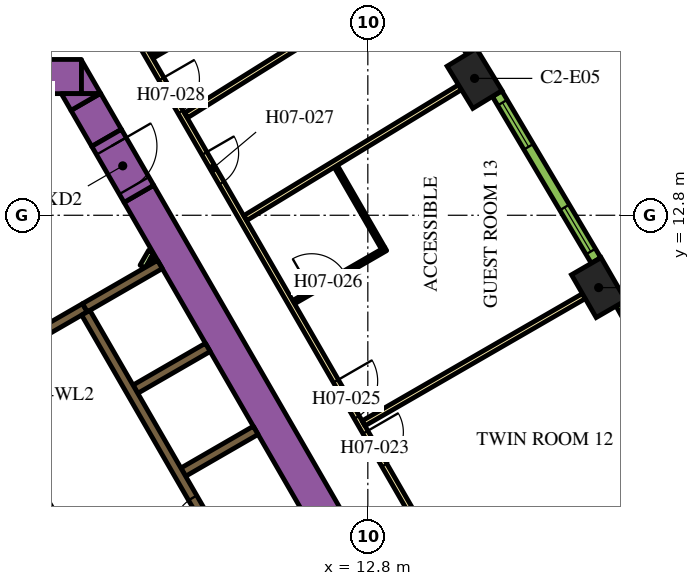
"""IFC4 building model, lengths in metres.
Left out: names, types, materials, properties, quantities, classifications, styles, units other than length and angle.
Written with IfcOpenShell. Run it as: python <this file> out.ifc"""

import sys

from ifc_helpers import new_model, si_unit, direction, frame, frame_2d, origin, origin_2d, place, context, subcontext, project, spatial, polyline, rectangle, outline, extrude, element, fill, save


model = new_model("IFC4")
c1 = context("Model", 3, precision=1e-05, world=origin(), true_north=direction((0.0, 1.0)))
c2 = subcontext(c1, "Body", "Model", "MODEL_VIEW")
j1 = project(units=[si_unit("LENGTHUNIT", "METRE"), si_unit("PLANEANGLEUNIT", "RADIAN")], contexts=[c1])
p1 = place(None, origin())
s1 = spatial("IfcSite", under=j1, at=p1, CompositionType="ELEMENT")
p2 = place(p1, origin())
s2 = spatial("IfcBuilding", under=s1, at=p2, CompositionType="ELEMENT")
p3 = place(p2, frame((0.0, 0.0, 99.3)))
s3 = spatial("IfcBuildingStorey", under=s2, at=p3, CompositionType="ELEMENT", Elevation=99.3)
for number, where, z_axis, x_axis in (
    (1, (18.874, 10.897, 0.0), (0.0, 0.0, 1.0), (-0.5, 0.866, 0.0)),
    (2, (15.609, 16.402, 0.0), (0.0, 0.0, 1.0), (-0.52, 0.854, 0.0)),
):
    element("IfcColumn", number, at=place(p3, frame(where, z_axis=z_axis, x_axis=x_axis)), inside=s3, PredefinedType="COLUMN", context=c2, shape_type="SweptSolid", body=[
        extrude(rectangle(XDim=1.3, YDim=0.9, at=origin_2d()), origin(), (0.0, 0.0, 1.0), 3.9),
    ])
p4 = place(p3, frame((6.776, 13.364, 0.0), z_axis=(0.0, 0.0, 1.0), x_axis=(0.500004177138, -0.8660229921, 0.0)))
e3 = element("IfcWall", 3, at=p4, inside=s3, PredefinedType="SOLIDWALL", context=c2, shape_type="SweptSolid", body=[
    extrude(rectangle(XDim=20.204, YDim=0.9, at=frame_2d((10.102, 0.0))), origin(), (0.0, 0.0, 1.0), 3.9),
])
p5 = place(p3, frame((-4.224, 16.45, 0.0), z_axis=(0.0, 0.0, 1.0), x_axis=(1.0, 0.0, 0.0)))
e4 = element("IfcWall", 4, at=p5, inside=s3, PredefinedType="SOLIDWALL", context=c2, shape_type="SweptSolid", body=[
    extrude(rectangle(XDim=9.488, YDim=0.9, at=frame_2d((4.744, 0.0))), origin(), (0.0, 0.0, 1.0), 3.9),
])
p6 = place(p3, origin())
e5 = element("IfcWall", 5, at=p6, inside=s3, PredefinedType="SOLIDWALL", context=c2, shape_type="SweptSolid", body=[
    extrude(outline(polyline([(5.265, 16.0), (5.265, 16.88), (5.773, 16.0), (5.265, 16.0)])), origin(), (0.0, 0.0, 1.0), 3.9),
])
p7 = place(p3, frame((5.926, 14.836, 0.0), z_axis=(0.0, 0.0, 1.0), x_axis=(-0.500076735116, 0.865981096212, 0.0)))
e6 = element("IfcWall", 6, at=p7, inside=s3, PredefinedType="SOLIDWALL", context=c2, shape_type="SweptSolid", body=[
    extrude(rectangle(XDim=1.094, YDim=0.9, at=frame_2d((0.547, 0.0))), origin(), (0.0, 0.0, 1.0), 3.9),
])
e7 = element("IfcWall", 7, at=p6, inside=s3, PredefinedType="SOLIDWALL", context=c2, shape_type="SweptSolid", body=[
    extrude(outline(polyline([(4.734, 16.0), (5.75, 16.0), (4.988, 15.56), (4.734, 16.0)])), origin(), (0.0, 0.0, 1.0), 3.9),
])
e8 = element("IfcWall", 8, at=p6, inside=s3, PredefinedType="SOLIDWALL", context=c2, shape_type="SweptSolid", body=[
    extrude(outline(polyline([(0.566, 6.725), (0.566, 6.875), (0.566, 6.875), (0.565, 6.875), (0.361, 6.875), (0.035, 7.439), (0.252, 7.564), (0.377, 7.348), (6.552, -3.348), (6.677, -3.564), (6.46, -3.689), (0.448, 6.725), (0.565, 6.725), (0.566, 6.725), (0.566, 6.725)])), origin(), (0.0, 0.0, 1.0), 3.9),
])
p8 = place(p3, frame((4.358, 9.791, 0.0), z_axis=(0.0, 0.0, 1.0), x_axis=(0.866079547155, 0.499906209203, 0.0)))
e9 = element("IfcWall", 9, at=p8, inside=s3, PredefinedType="SOLIDWALL", context=c2, shape_type="SweptSolid", body=[
    extrude(rectangle(XDim=1.15, YDim=0.25, at=frame_2d((0.575, 0.0))), origin(), (0.0, 0.0, 1.0), 3.9),
])
p9 = place(p3, frame((5.356, 10.367, 0.0), z_axis=(0.0, 0.0, 1.0), x_axis=(0.865978535641, 0.50008116922, 0.0)))
e10 = element("IfcWall", 10, at=p9, inside=s3, PredefinedType="SOLIDWALL", context=c2, shape_type="SweptSolid", body=[
    extrude(rectangle(XDim=2.278, YDim=0.25, at=frame_2d((1.139, 0.0))), origin(), (0.0, 0.0, 1.0), 3.9),
])
for number, where, z_axis, x_axis in (
    (11, (6.684, 8.224, 0.0), (0.0, 0.0, 1.0), (0.866, 0.5, 0.0)),
    (12, (7.944, 6.041, 0.0), (0.0, 0.0, 1.0), (0.866, 0.5, 0.0)),
):
    element("IfcWall", number, at=place(p3, frame(where, z_axis=z_axis, x_axis=x_axis)), inside=s3, PredefinedType="SOLIDWALL", context=c2, shape_type="SweptSolid", body=[
        extrude(rectangle(XDim=2.2, YDim=0.25, at=frame_2d((1.1, 0.0))), origin(), (0.0, 0.0, 1.0), 3.9),
    ])
p10 = place(p3, frame((6.872, 11.45, 0.0), z_axis=(0.0, 0.0, 1.0), x_axis=(0.499846793097, 0.866113839764, 0.0)))
e13 = element("IfcWall", 13, at=p10, inside=s3, PredefinedType="PARTITIONING", context=c2, shape_type="SweptSolid", body=[
    extrude(rectangle(XDim=0.453, YDim=0.15, at=frame_2d((0.227, 0.0))), origin(), (0.0, 0.0, 1.0), 2.75),
])
p11 = place(p3, frame((7.131, 11.6, 0.0), z_axis=(0.0, 0.0, 1.0), x_axis=(0.498600033135, 0.866832167699, 0.0)))
e14 = element("IfcWall", 14, at=p11, inside=s3, PredefinedType="PARTITIONING", context=c2, shape_type="SweptSolid", body=[
    extrude(rectangle(XDim=0.107, YDim=0.15, at=frame_2d((0.053, 0.0))), origin(), (0.0, 0.0, 1.0), 2.75),
])
p12 = place(p3, frame((11.553, -0.46, 0.0), z_axis=(0.0, 0.0, 1.0), x_axis=(-0.500006514828, 0.866021642414, 0.0)))
e15 = element("IfcWall", 15, at=p12, inside=s3, PredefinedType="SOLIDWALL", context=c2, shape_type="SweptSolid", body=[
    extrude(rectangle(XDim=12.35, YDim=0.25, at=frame_2d((6.175, 0.0))), origin(), (0.0, 0.0, 1.0), 3.9),
])
p13 = place(p12, frame((0.585, 0.0, 0.0)))
e16 = element("IfcOpeningElement", 16, at=p13, cuts=e15, PredefinedType="OPENING", context=c2, shape_type="SweptSolid", body=[
    extrude(rectangle(XDim=1.1, YDim=2.1, at=frame_2d((0.55, 1.05))), frame((0.0, 0.135, 0.0), z_axis=(0.0, -1.0, 0.0), x_axis=(1.0, 0.0, 0.0)), (0.0, 0.0, 1.0), 0.27),
])
p14 = place(p12, frame((3.105, 0.0, 0.0)))
e17 = element("IfcOpeningElement", 17, at=p14, cuts=e15, PredefinedType="OPENING", context=c2, shape_type="SweptSolid", body=[
    extrude(rectangle(XDim=1.1, YDim=2.1, at=frame_2d((0.55, 1.05))), frame((0.0, 0.135, 0.0), z_axis=(0.0, -1.0, 0.0), x_axis=(1.0, 0.0, 0.0)), (0.0, 0.0, 1.0), 0.27),
])
p15 = place(p12, frame((5.625, 0.0, 0.0)))
e18 = element("IfcOpeningElement", 18, at=p15, cuts=e15, PredefinedType="OPENING", context=c2, shape_type="SweptSolid", body=[
    extrude(rectangle(XDim=1.1, YDim=2.1, at=frame_2d((0.55, 1.05))), frame((0.0, 0.135, 0.0), z_axis=(0.0, -1.0, 0.0), x_axis=(1.0, 0.0, 0.0)), (0.0, 0.0, 1.0), 0.27),
])
p16 = place(p3, frame((8.565, -2.185, 0.0), z_axis=(0.0, 0.0, 1.0), x_axis=(-0.499997954832, 0.866026584559, 0.0)))
e19 = element("IfcWall", 19, at=p16, inside=s3, PredefinedType="SOLIDWALL", context=c2, shape_type="SweptSolid", body=[
    extrude(rectangle(XDim=12.35, YDim=0.25, at=frame_2d((6.175, 0.0))), origin(), (0.0, 0.0, 1.0), 3.9),
])
p17 = place(p16, frame((5.725, 0.0, 0.0)))
e20 = element("IfcOpeningElement", 20, at=p17, cuts=e19, PredefinedType="OPENING", context=c2, shape_type="SweptSolid", body=[
    extrude(rectangle(XDim=0.9, YDim=2.1, at=frame_2d((0.45, 1.05))), frame((0.0, 0.135, 0.0), z_axis=(0.0, -1.0, 0.0), x_axis=(1.0, 0.0, 0.0)), (0.0, 0.0, 1.0), 0.27),
])
p18 = place(p3, frame((5.926, 14.836, 0.0), z_axis=(0.0, 0.0, 1.0), x_axis=(0.500062241894, -0.865989465428, 0.0)))
e21 = element("IfcWall", 21, at=p18, inside=s3, PredefinedType="SOLIDWALL", context=c2, shape_type="SweptSolid", body=[
    extrude(rectangle(XDim=1.7, YDim=0.9, at=frame_2d((0.85, 0.0))), origin(), (0.0, 0.0, 1.0), 3.9),
])
p19 = place(p18, frame((0.25, 0.0, 0.0)))
e22 = element("IfcOpeningElement", 22, at=p19, cuts=e21, PredefinedType="OPENING", context=c2, shape_type="SweptSolid", body=[
    extrude(rectangle(XDim=1.2, YDim=2.1, at=frame_2d((0.6, 1.05))), frame((0.0, 0.46, 0.0), z_axis=(0.0, -1.0, 0.0), x_axis=(1.0, 0.0, 0.0)), (0.0, 0.0, 1.0), 0.92),
])
p20 = place(p3, frame((6.163, 18.475, 0.0), z_axis=(0.0, 0.0, 1.0), x_axis=(0.500001317485, -0.866024643133, 0.0)))
e23 = element("IfcWall", 23, at=p20, inside=s3, PredefinedType="PARTITIONING", context=c2, shape_type="SweptSolid", body=[
    extrude(rectangle(XDim=25.767, YDim=0.15, at=frame_2d((12.883, 0.0))), origin(), (0.0, 0.0, 1.0), 2.75),
])
p21 = place(p20, frame((24.241, 0.0, 0.0)))
e24 = element("IfcOpeningElement", 24, at=p21, cuts=e23, PredefinedType="OPENING", context=c2, shape_type="SweptSolid", body=[
    extrude(rectangle(XDim=1.0, YDim=2.1, at=frame_2d((0.5, 1.05))), frame((0.0, 0.085, 0.0), z_axis=(0.0, -1.0, 0.0), x_axis=(1.0, 0.0, 0.0)), (0.0, 0.0, 1.0), 0.17),
])
p22 = place(p20, frame((13.144, 0.0, 0.0)))
e25 = element("IfcOpeningElement", 25, at=p22, cuts=e23, PredefinedType="OPENING", context=c2, shape_type="SweptSolid", body=[
    extrude(rectangle(XDim=1.0, YDim=2.1, at=frame_2d((0.5, 1.05))), frame((0.0, 0.085, 0.0), z_axis=(0.0, -1.0, 0.0), x_axis=(1.0, 0.0, 0.0)), (0.0, 0.0, 1.0), 0.17),
])
p23 = place(p20, frame((11.592, 0.0, 0.0)))
e26 = element("IfcOpeningElement", 26, at=p23, cuts=e23, PredefinedType="OPENING", context=c2, shape_type="SweptSolid", body=[
    extrude(rectangle(XDim=1.1, YDim=2.1, at=frame_2d((0.55, 1.05))), frame((0.0, 0.085, 0.0), z_axis=(0.0, -1.0, 0.0), x_axis=(1.0, 0.0, 0.0)), (0.0, 0.0, 1.0), 0.17),
])
p24 = place(p20, frame((4.674, 0.0, 0.0)))
e27 = element("IfcOpeningElement", 27, at=p24, cuts=e23, PredefinedType="OPENING", context=c2, shape_type="SweptSolid", body=[
    extrude(rectangle(XDim=0.9, YDim=2.1, at=frame_2d((0.45, 1.05))), frame((0.0, 0.085, 0.0), z_axis=(0.0, -1.0, 0.0), x_axis=(1.0, 0.0, 0.0)), (0.0, 0.0, 1.0), 0.17),
])
p25 = place(p20, frame((2.411, 0.0, 0.0)))
e28 = element("IfcOpeningElement", 28, at=p25, cuts=e23, PredefinedType="OPENING", context=c2, shape_type="SweptSolid", body=[
    extrude(rectangle(XDim=1.0, YDim=2.1, at=frame_2d((0.5, 1.05))), frame((0.0, 0.085, 0.0), z_axis=(0.0, -1.0, 0.0), x_axis=(1.0, 0.0, 0.0)), (0.0, 0.0, 1.0), 0.17),
])
p26 = place(p3, frame((14.049, 19.2, 0.0), z_axis=(0.0, 0.0, 1.0), x_axis=(-0.847955867271, -0.530066832731, 0.0)))
e29 = element("IfcWall", 29, at=p26, inside=s3, PredefinedType="PARTITIONING", context=c2, shape_type="SweptSolid", body=[
    extrude(rectangle(XDim=7.111, YDim=0.15, at=frame_2d((3.556, 0.0))), origin(), (0.0, 0.0, 1.0), 2.75),
])
p27 = place(p3, frame((15.225, 16.167, 0.0), z_axis=(0.0, 0.0, 1.0), x_axis=(-0.854088713274, -0.520127359266, 0.0)))
e30 = element("IfcWall", 30, at=p27, inside=s3, PredefinedType="PARTITIONING", context=c2, shape_type="SweptSolid", body=[
    extrude(rectangle(XDim=6.611, YDim=0.15, at=frame_2d((3.305, 0.0))), origin(), (0.0, 0.0, 1.0), 2.75),
])
p28 = place(p3, frame((18.484, 10.672, 0.0), z_axis=(0.0, 0.0, 1.0), x_axis=(-0.866019162053, -0.50001081084, 0.0)))
e31 = element("IfcWall", 31, at=p28, inside=s3, PredefinedType="PARTITIONING", context=c2, shape_type="SweptSolid", body=[
    extrude(rectangle(XDim=6.694, YDim=0.15, at=frame_2d((3.347, 0.0))), origin(), (0.0, 0.0, 1.0), 2.75),
])
p29 = place(p3, frame((21.614, 5.102, 0.0), z_axis=(0.0, 0.0, 1.0), x_axis=(-0.877484555087, -0.479604895287, 0.0)))
e32 = element("IfcWall", 32, at=p29, inside=s3, PredefinedType="PARTITIONING", context=c2, shape_type="SweptSolid", body=[
    extrude(rectangle(XDim=6.611, YDim=0.15, at=frame_2d((3.306, 0.0))), origin(), (0.0, 0.0, 1.0), 2.75),
])
p30 = place(p3, frame((10.847, 10.513, 0.0), z_axis=(0.0, 0.0, 1.0), x_axis=(0.865996816683, 0.500049511043, 0.0)))
e33 = element("IfcWall", 33, at=p30, inside=s3, PredefinedType="PARTITIONING", context=c2, shape_type="SweptSolid", body=[
    extrude(rectangle(XDim=2.8, YDim=0.1, at=frame_2d((1.4, 0.0))), origin(), (0.0, 0.0, 1.0), 2.75),
])
p31 = place(p30, frame((0.55, 0.0, 0.0)))
e34 = element("IfcOpeningElement", 34, at=p31, cuts=e33, PredefinedType="OPENING", context=c2, shape_type="SweptSolid", body=[
    extrude(rectangle(XDim=1.0, YDim=2.1, at=frame_2d((0.5, 1.05))), frame((0.0, 0.06, 0.0), z_axis=(0.0, -1.0, 0.0), x_axis=(1.0, 0.0, 0.0)), (0.0, 0.0, 1.0), 0.12),
])
p32 = place(p3, frame((13.203, 11.931, 0.0), z_axis=(0.0, 0.0, 1.0), x_axis=(-0.499988411372, 0.866032094379, 0.0)))
e35 = element("IfcWall", 35, at=p32, inside=s3, PredefinedType="PARTITIONING", context=c2, shape_type="SweptSolid", body=[
    extrude(rectangle(XDim=2.49, YDim=0.1, at=frame_2d((1.245, 0.0))), origin(), (0.0, 0.0, 1.0), 2.75),
])
p33 = place(p3, frame((7.118, 16.971, 0.0), z_axis=(0.0, 0.0, 1.0), x_axis=(0.866021400173, 0.500006934395, 0.0)))
e36 = element("IfcWall", 36, at=p33, inside=s3, PredefinedType="PARTITIONING", context=c2, shape_type="SweptSolid", body=[
    extrude(rectangle(XDim=2.6, YDim=0.1, at=frame_2d((1.3, 0.0))), origin(), (0.0, 0.0, 1.0), 2.75),
])
p34 = place(p33, frame((0.6, 0.0, 0.0)))
e37 = element("IfcOpeningElement", 37, at=p34, cuts=e36, PredefinedType="OPENING", context=c2, shape_type="SweptSolid", body=[
    extrude(rectangle(XDim=0.9, YDim=2.1, at=frame_2d((0.45, 1.05))), frame((0.0, 0.06, 0.0), z_axis=(0.0, -1.0, 0.0), x_axis=(1.0, 0.0, 0.0)), (0.0, 0.0, 1.0), 0.12),
])
p35 = place(p3, frame((21.956, 6.033, 0.0), z_axis=(0.0, 0.0, 1.0), x_axis=(-0.48983164787, 0.87181704316, 0.0)))
e38 = element("IfcWall", 38, at=p35, inside=s3, PredefinedType="SOLIDWALL", context=c2, shape_type="SweptSolid", body=[
    extrude(rectangle(XDim=5.1, YDim=0.29, at=frame_2d((2.55, 0.0))), origin(), (0.0, 0.0, 1.0), 3.65),
])
p36 = place(p35, frame((0.273, 0.0, 0.9)))
e39 = element("IfcOpeningElement", 39, at=p36, cuts=e38, PredefinedType="OPENING", context=c2, shape_type="SweptSolid", body=[
    extrude(rectangle(XDim=1.35, YDim=2.15, at=frame_2d((0.675, 1.075))), frame((0.0, 0.155, 0.0), z_axis=(0.0, -1.0, 0.0), x_axis=(1.0, 0.0, 0.0)), (0.0, 0.0, 1.0), 0.31),
])
p37 = place(p35, frame((3.478, 0.0, 0.9)))
e40 = element("IfcOpeningElement", 40, at=p37, cuts=e38, PredefinedType="OPENING", context=c2, shape_type="SweptSolid", body=[
    extrude(rectangle(XDim=1.35, YDim=2.15, at=frame_2d((0.675, 1.075))), frame((0.0, 0.155, 0.0), z_axis=(0.0, -1.0, 0.0), x_axis=(1.0, 0.0, 0.0)), (0.0, 0.0, 1.0), 0.31),
])
p38 = place(p3, frame((18.805, 11.611, 0.0), z_axis=(0.0, 0.0, 1.0), x_axis=(-0.510054281659, 0.860142214847, 0.0)))
e41 = element("IfcWall", 41, at=p38, inside=s3, PredefinedType="SOLIDWALL", context=c2, shape_type="SweptSolid", body=[
    extrude(rectangle(XDim=5.101, YDim=0.29, at=frame_2d((2.55, 0.0))), origin(), (0.0, 0.0, 1.0), 3.65),
])
p39 = place(p38, frame((0.273, 0.0, 0.9)))
e42 = element("IfcOpeningElement", 42, at=p39, cuts=e41, PredefinedType="OPENING", context=c2, shape_type="SweptSolid", body=[
    extrude(rectangle(XDim=1.35, YDim=2.15, at=frame_2d((0.675, 1.075))), frame((0.0, 0.155, 0.0), z_axis=(0.0, -1.0, 0.0), x_axis=(1.0, 0.0, 0.0)), (0.0, 0.0, 1.0), 0.31),
])
p40 = place(p38, frame((3.478, 0.0, 0.9)))
e43 = element("IfcOpeningElement", 43, at=p40, cuts=e41, PredefinedType="OPENING", context=c2, shape_type="SweptSolid", body=[
    extrude(rectangle(XDim=1.35, YDim=2.15, at=frame_2d((0.675, 1.075))), frame((0.0, 0.155, 0.0), z_axis=(0.0, -1.0, 0.0), x_axis=(1.0, 0.0, 0.0)), (0.0, 0.0, 1.0), 0.31),
])
p41 = place(p3, frame((15.524, 17.114, 0.0), z_axis=(0.0, 0.0, 1.0), x_axis=(-0.530072082134, 0.847952585787, 0.0)))
e44 = element("IfcWall", 44, at=p41, inside=s3, PredefinedType="SOLIDWALL", context=c2, shape_type="SweptSolid", body=[
    extrude(rectangle(XDim=5.1, YDim=0.29, at=frame_2d((2.55, 0.0))), origin(), (0.0, 0.0, 1.0), 3.65),
])
p42 = place(p41, frame((0.273, 0.0, 0.9)))
e45 = element("IfcOpeningElement", 45, at=p42, cuts=e44, PredefinedType="OPENING", context=c2, shape_type="SweptSolid", body=[
    extrude(rectangle(XDim=1.35, YDim=2.15, at=frame_2d((0.675, 1.075))), frame((0.0, 0.155, 0.0), z_axis=(0.0, -1.0, 0.0), x_axis=(1.0, 0.0, 0.0)), (0.0, 0.0, 1.0), 0.31),
])
p43 = place(p41, frame((3.478, 0.0, 0.9)))
e46 = element("IfcOpeningElement", 46, at=p43, cuts=e44, PredefinedType="OPENING", context=c2, shape_type="SweptSolid", body=[
    extrude(rectangle(XDim=1.35, YDim=2.15, at=frame_2d((0.675, 1.075))), frame((0.0, 0.155, 0.0), z_axis=(0.0, -1.0, 0.0), x_axis=(1.0, 0.0, 0.0)), (0.0, 0.0, 1.0), 0.31),
])
p44 = place(p15, origin())
e47 = element("IfcDoor", 47, at=p44, inside=s3, OperationType="DOUBLE_DOOR_SLIDING", PredefinedType="DOOR", context=c2, shape_type="SweptSolid", body=[
    extrude(rectangle(XDim=1.1, YDim=2.1, at=frame_2d((0.55, 1.05))), frame((0.0, 0.025, 0.0), z_axis=(0.0, -1.0, 0.0), x_axis=(1.0, 0.0, 0.0)), (0.0, 0.0, 1.0), 0.05),
])
fill(e18, e47)
p45 = place(p19, origin())
e48 = element("IfcDoor", 48, at=p45, inside=s3, OperationType="SINGLE_SWING_LEFT", PredefinedType="DOOR", context=c2, shape_type="SweptSolid", body=[
    extrude(rectangle(XDim=1.2, YDim=2.1, at=frame_2d((0.6, 1.05))), frame((0.0, 0.025, 0.0), z_axis=(0.0, -1.0, 0.0), x_axis=(1.0, 0.0, 0.0)), (0.0, 0.0, 1.0), 0.05),
])
fill(e22, e48)
p46 = place(p22, origin())
e49 = element("IfcDoor", 49, at=p46, inside=s3, OperationType="SINGLE_SWING_LEFT", PredefinedType="DOOR", context=c2, shape_type="SweptSolid", body=[
    extrude(rectangle(XDim=1.0, YDim=2.1, at=frame_2d((0.5, 1.05))), frame((0.0, 0.025, 0.0), z_axis=(0.0, -1.0, 0.0), x_axis=(1.0, 0.0, 0.0)), (0.0, 0.0, 1.0), 0.05),
])
fill(e25, e49)
p47 = place(p23, origin())
e50 = element("IfcDoor", 50, at=p47, inside=s3, OperationType="SINGLE_SWING_RIGHT", PredefinedType="DOOR", context=c2, shape_type="SweptSolid", body=[
    extrude(rectangle(XDim=1.1, YDim=2.1, at=frame_2d((0.55, 1.05))), frame((0.0, 0.025, 0.0), z_axis=(0.0, -1.0, 0.0), x_axis=(1.0, 0.0, 0.0)), (0.0, 0.0, 1.0), 0.05),
])
fill(e26, e50)
p48 = place(p31, origin())
e51 = element("IfcDoor", 51, at=p48, inside=s3, OperationType="SINGLE_SWING_LEFT", PredefinedType="DOOR", context=c2, shape_type="SweptSolid", body=[
    extrude(rectangle(XDim=1.0, YDim=2.1, at=frame_2d((0.5, 1.05))), frame((0.0, 0.025, 0.0), z_axis=(0.0, -1.0, 0.0), x_axis=(1.0, 0.0, 0.0)), (0.0, 0.0, 1.0), 0.05),
])
fill(e34, e51)
p49 = place(p24, origin())
e52 = element("IfcDoor", 52, at=p49, inside=s3, OperationType="SINGLE_SWING_RIGHT", PredefinedType="DOOR", context=c2, shape_type="SweptSolid", body=[
    extrude(rectangle(XDim=0.9, YDim=2.1, at=frame_2d((0.45, 1.05))), frame((0.0, 0.025, 0.0), z_axis=(0.0, -1.0, 0.0), x_axis=(1.0, 0.0, 0.0)), (0.0, 0.0, 1.0), 0.05),
])
fill(e27, e52)
p50 = place(p25, origin())
e53 = element("IfcDoor", 53, at=p50, inside=s3, OperationType="SINGLE_SWING_RIGHT", PredefinedType="DOOR", context=c2, shape_type="SweptSolid", body=[
    extrude(rectangle(XDim=1.0, YDim=2.1, at=frame_2d((0.5, 1.05))), frame((0.0, 0.025, 0.0), z_axis=(0.0, -1.0, 0.0), x_axis=(1.0, 0.0, 0.0)), (0.0, 0.0, 1.0), 0.05),
])
fill(e28, e53)
p51 = place(p39, origin())
e54 = element("IfcWindow", 54, at=p51, inside=s3, PartitioningType="DOUBLE_PANEL_VERTICAL", PredefinedType="WINDOW", context=c2, shape_type="SweptSolid", body=[
    extrude(rectangle(XDim=1.35, YDim=2.15, at=frame_2d((0.675, 1.075))), frame((0.0, 0.015, 0.0), z_axis=(0.0, -1.0, 0.0), x_axis=(1.0, 0.0, 0.0)), (0.0, 0.0, 1.0), 0.06),
])
fill(e42, e54)
p52 = place(p40, origin())
e55 = element("IfcWindow", 55, at=p52, inside=s3, PartitioningType="DOUBLE_PANEL_VERTICAL", PredefinedType="WINDOW", context=c2, shape_type="SweptSolid", body=[
    extrude(rectangle(XDim=1.35, YDim=2.15, at=frame_2d((0.675, 1.075))), frame((0.0, 0.015, 0.0), z_axis=(0.0, -1.0, 0.0), x_axis=(1.0, 0.0, 0.0)), (0.0, 0.0, 1.0), 0.06),
])
fill(e43, e55)
save(model, sys.argv[1])
